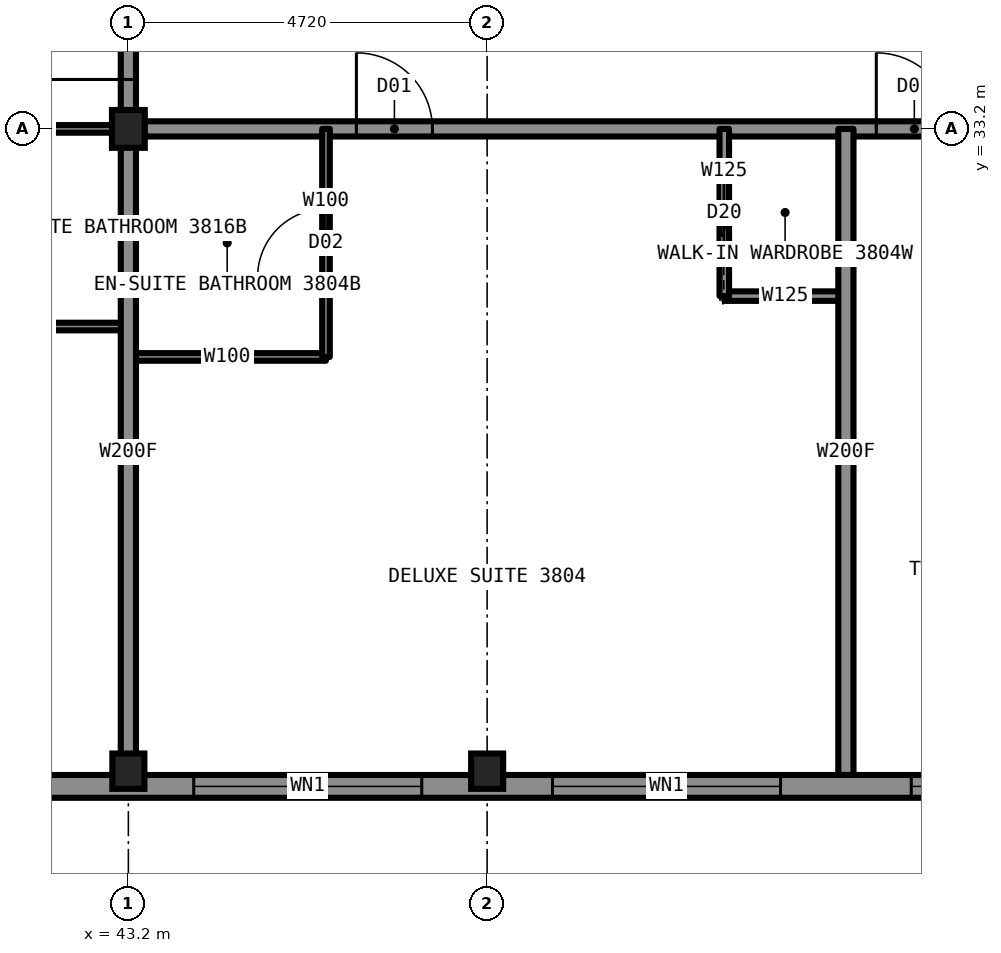
"""IFC4 building model, lengths in metres.
Left out: names, types, materials, properties, quantities, classifications, styles, units other than length and angle.
Written with IfcOpenShell. Run it as: python <this file> out.ifc"""

import sys

from ifc_helpers import new_model, si_unit, direction, frame, frame_2d, origin, origin_2d, place, context, subcontext, project, spatial, rectangle, i_section, extrude, element, fill, save


model = new_model("IFC4")
c1 = context("Model", 3, precision=1e-05, world=origin(), true_north=direction((0.0, 1.0)))
c2 = subcontext(c1, "Body", "Model", "MODEL_VIEW")
j1 = project(units=[si_unit("LENGTHUNIT", "METRE"), si_unit("PLANEANGLEUNIT", "RADIAN")], contexts=[c1])
p1 = place(None, origin())
s1 = spatial("IfcSite", under=j1, at=p1, CompositionType="ELEMENT")
p2 = place(p1, origin())
s2 = spatial("IfcBuilding", under=s1, at=p2, CompositionType="ELEMENT")
p3 = place(p2, frame((0.0, 0.0, 135.4)))
s3 = spatial("IfcBuildingStorey", under=s2, at=p3, CompositionType="ELEMENT", Elevation=135.4)
for number, where, z_axis, x_axis in (
    (1, (43.2, 24.75, 0.0), (0.0, 0.0, 1.0), (1.0, 0.0, 0.0)),
    (2, (47.92, 24.75, 0.0), (0.0, 0.0, 1.0), (1.0, 0.0, 0.0)),
):
    element("IfcColumn", number, at=place(p3, frame(where, z_axis=z_axis, x_axis=x_axis)), inside=s3, PredefinedType="COLUMN", context=c2, shape_type="SweptSolid", body=[
        extrude(i_section(OverallWidth=0.422, OverallDepth=0.465, WebThickness=0.045, FlangeThickness=0.073, at=origin_2d()), origin(), (0.0, 0.0, 1.0), 3.5),
    ])
p4 = place(p3, frame((43.2, 33.2, 0.0), z_axis=(0.0, 0.0, 1.0), x_axis=(1.0, 0.0, 0.0)))
e3 = element("IfcColumn", 3, at=p4, inside=s3, PredefinedType="COLUMN", context=c2, shape_type="SweptSolid", body=[
    extrude(i_section(OverallWidth=0.432, OverallDepth=0.498, WebThickness=0.056, FlangeThickness=0.089, at=origin_2d()), origin(), (0.0, 0.0, 1.0), 3.5),
])
p5 = place(p3, frame((40.6, 33.2, 0.0), z_axis=(0.0, 0.0, 1.0), x_axis=(1.0, 0.0, 0.0)))
e4 = element("IfcWall", 4, at=p5, inside=s3, PredefinedType="PARTITIONING", context=c2, shape_type="SweptSolid", body=[
    extrude(rectangle(XDim=2.6, YDim=0.1, at=frame_2d((1.3, 0.0))), origin(), (0.0, 0.0, 1.0), 2.573),
])
p6 = place(p3, frame((43.2, 33.2, 0.0), z_axis=(0.0, 0.0, 1.0), x_axis=(1.0, 0.0, 0.0)))
e5 = element("IfcWall", 5, at=p6, inside=s3, PredefinedType="PARTITIONING", context=c2, shape_type="SweptSolid", body=[
    extrude(rectangle(XDim=23.6, YDim=0.2, at=frame_2d((11.8, 0.0))), origin(), (0.0, 0.0, 1.0), 3.33),
])
p7 = place(p6, frame((3.0, 0.0, 0.0)))
e6 = element("IfcOpeningElement", 6, at=p7, cuts=e5, PredefinedType="OPENING", context=c2, shape_type="SweptSolid", body=[
    extrude(rectangle(XDim=1.0, YDim=2.2, at=frame_2d((0.5, 1.1))), frame((0.0, 0.11, 0.0), z_axis=(0.0, -1.0, 0.0), x_axis=(1.0, 0.0, 0.0)), (0.0, 0.0, 1.0), 0.22),
])
p8 = place(p6, frame((9.84, 0.0, 0.0)))
e7 = element("IfcOpeningElement", 7, at=p8, cuts=e5, PredefinedType="OPENING", context=c2, shape_type="SweptSolid", body=[
    extrude(rectangle(XDim=1.0, YDim=2.2, at=frame_2d((0.5, 1.1))), frame((0.0, 0.11, 0.0), z_axis=(0.0, -1.0, 0.0), x_axis=(1.0, 0.0, 0.0)), (0.0, 0.0, 1.0), 0.22),
])
p9 = place(p6, frame((16.71, 0.0, 0.0)))
e8 = element("IfcOpeningElement", 8, at=p9, cuts=e5, PredefinedType="OPENING", context=c2, shape_type="SweptSolid", body=[
    extrude(rectangle(XDim=1.0, YDim=2.2, at=frame_2d((0.5, 1.1))), frame((0.0, 0.11, 0.0), z_axis=(0.0, -1.0, 0.0), x_axis=(1.0, 0.0, 0.0)), (0.0, 0.0, 1.0), 0.22),
])
p10 = place(p6, frame((20.34, 0.0, 0.0)))
e9 = element("IfcOpeningElement", 9, at=p10, cuts=e5, PredefinedType="OPENING", context=c2, shape_type="SweptSolid", body=[
    extrude(rectangle(XDim=1.0, YDim=2.2, at=frame_2d((0.5, 1.1))), frame((0.0, 0.11, 0.0), z_axis=(0.0, -1.0, 0.0), x_axis=(1.0, 0.0, 0.0)), (0.0, 0.0, 1.0), 0.22),
])
p11 = place(p3, frame((51.04, 31.0, 0.0), z_axis=(0.0, 0.0, 1.0), x_axis=(1.0, 0.0, 0.0)))
e10 = element("IfcWall", 10, at=p11, inside=s3, PredefinedType="PARTITIONING", context=c2, shape_type="SweptSolid", body=[
    extrude(rectangle(XDim=1.6, YDim=0.125, at=frame_2d((0.8, 0.0))), origin(), (0.0, 0.0, 1.0), 3.33),
])
p12 = place(p3, frame((40.6, 30.6, 0.0), z_axis=(0.0, 0.0, 1.0), x_axis=(1.0, 0.0, 0.0)))
e11 = element("IfcWall", 11, at=p12, inside=s3, PredefinedType="PARTITIONING", context=c2, shape_type="SweptSolid", body=[
    extrude(rectangle(XDim=2.6, YDim=0.1, at=frame_2d((1.3, 0.0))), origin(), (0.0, 0.0, 1.0), 3.33),
])
p13 = place(p3, frame((43.2, 30.2, 0.0), z_axis=(0.0, 0.0, 1.0), x_axis=(1.0, 0.0, 0.0)))
e12 = element("IfcWall", 12, at=p13, inside=s3, PredefinedType="PARTITIONING", context=c2, shape_type="SweptSolid", body=[
    extrude(rectangle(XDim=2.6, YDim=0.1, at=frame_2d((1.3, 0.0))), origin(), (0.0, 0.0, 1.0), 3.33),
])
p14 = place(p3, frame((43.2, 33.2, 0.0), z_axis=(0.0, 0.0, 1.0), x_axis=(0.0, 1.0, 0.0)))
e13 = element("IfcWall", 13, at=p14, inside=s3, PredefinedType="PARTITIONING", context=c2, shape_type="SweptSolid", body=[
    extrude(rectangle(XDim=23.6, YDim=0.2, at=frame_2d((11.8, 0.0))), origin(), (0.0, 0.0, 1.0), 3.33),
])
p15 = place(p14, frame((6.98, 0.0, 0.0)))
e14 = element("IfcOpeningElement", 14, at=p15, cuts=e13, PredefinedType="OPENING", context=c2, shape_type="SweptSolid", body=[
    extrude(rectangle(XDim=1.0, YDim=2.2, at=frame_2d((0.5, 1.1))), frame((0.0, 0.11, 0.0), z_axis=(0.0, -1.0, 0.0), x_axis=(1.0, 0.0, 0.0)), (0.0, 0.0, 1.0), 0.22),
])
p16 = place(p14, frame((11.7, 0.0, 0.0)))
e15 = element("IfcOpeningElement", 15, at=p16, cuts=e13, PredefinedType="OPENING", context=c2, shape_type="SweptSolid", body=[
    extrude(rectangle(XDim=1.0, YDim=2.2, at=frame_2d((0.5, 1.1))), frame((0.0, 0.11, 0.0), z_axis=(0.0, -1.0, 0.0), x_axis=(1.0, 0.0, 0.0)), (0.0, 0.0, 1.0), 0.22),
])
p17 = place(p14, frame((15.62, 0.0, 0.0)))
e16 = element("IfcOpeningElement", 16, at=p17, cuts=e13, PredefinedType="OPENING", context=c2, shape_type="SweptSolid", body=[
    extrude(rectangle(XDim=1.0, YDim=2.2, at=frame_2d((0.5, 1.1))), frame((0.0, 0.11, 0.0), z_axis=(0.0, -1.0, 0.0), x_axis=(1.0, 0.0, 0.0)), (0.0, 0.0, 1.0), 0.22),
])
p18 = place(p14, frame((21.85, 0.0, 0.0)))
e17 = element("IfcOpeningElement", 17, at=p18, cuts=e13, PredefinedType="OPENING", context=c2, shape_type="SweptSolid", body=[
    extrude(rectangle(XDim=1.1, YDim=2.2, at=frame_2d((0.55, 1.1))), frame((0.0, 0.11, 0.0), z_axis=(0.0, -1.0, 0.0), x_axis=(1.0, 0.0, 0.0)), (0.0, 0.0, 1.0), 0.22),
])
p19 = place(p14, frame((0.65, 0.0, 0.0)))
e18 = element("IfcOpeningElement", 18, at=p19, cuts=e13, PredefinedType="OPENING", context=c2, shape_type="SweptSolid", body=[
    extrude(rectangle(XDim=1.1, YDim=2.2, at=frame_2d((0.55, 1.1))), frame((0.0, 0.11, 0.0), z_axis=(0.0, -1.0, 0.0), x_axis=(1.0, 0.0, 0.0)), (0.0, 0.0, 1.0), 0.22),
])
p20 = place(p3, frame((43.2, 24.7, 0.0), z_axis=(0.0, 0.0, 1.0), x_axis=(0.0, 1.0, 0.0)))
e19 = element("IfcWall", 19, at=p20, inside=s3, PredefinedType="PARTITIONING", context=c2, shape_type="SweptSolid", body=[
    extrude(rectangle(XDim=8.5, YDim=0.2, at=frame_2d((4.25, 0.0))), origin(), (0.0, 0.0, 1.0), 2.573),
])
p21 = place(p3, frame((52.64, 24.7, 0.0), z_axis=(0.0, 0.0, 1.0), x_axis=(0.0, 1.0, 0.0)))
e20 = element("IfcWall", 20, at=p21, inside=s3, PredefinedType="PARTITIONING", context=c2, shape_type="SweptSolid", body=[
    extrude(rectangle(XDim=8.5, YDim=0.2, at=frame_2d((4.25, 0.0))), origin(), (0.0, 0.0, 1.0), 3.33),
])
p22 = place(p3, frame((51.04, 31.0, 0.0), z_axis=(0.0, 0.0, 1.0), x_axis=(0.0, 1.0, 0.0)))
e21 = element("IfcWall", 21, at=p22, inside=s3, PredefinedType="PARTITIONING", context=c2, shape_type="SweptSolid", body=[
    extrude(rectangle(XDim=2.2, YDim=0.125, at=frame_2d((1.1, 0.0))), origin(), (0.0, 0.0, 1.0), 3.33),
])
p23 = place(p22, frame((0.7, 0.0, 0.0)))
e22 = element("IfcOpeningElement", 22, at=p23, cuts=e21, PredefinedType="OPENING", context=c2, shape_type="SweptSolid", body=[
    extrude(rectangle(XDim=0.8, YDim=2.1, at=frame_2d((0.4, 1.05))), frame((0.0, 0.073, 0.0), z_axis=(0.0, -1.0, 0.0), x_axis=(1.0, 0.0, 0.0)), (0.0, 0.0, 1.0), 0.145),
])
p24 = place(p3, frame((45.8, 30.2, 0.0), z_axis=(0.0, 0.0, 1.0), x_axis=(0.0, 1.0, 0.0)))
e23 = element("IfcWall", 23, at=p24, inside=s3, PredefinedType="PARTITIONING", context=c2, shape_type="SweptSolid", body=[
    extrude(rectangle(XDim=3.0, YDim=0.1, at=frame_2d((1.5, 0.0))), origin(), (0.0, 0.0, 1.0), 3.33),
])
p25 = place(p24, frame((1.05, 0.0, 0.0)))
e24 = element("IfcOpeningElement", 24, at=p25, cuts=e23, PredefinedType="OPENING", context=c2, shape_type="SweptSolid", body=[
    extrude(rectangle(XDim=0.9, YDim=2.1, at=frame_2d((0.45, 1.05))), frame((0.0, 0.06, 0.0), z_axis=(0.0, -1.0, 0.0), x_axis=(1.0, 0.0, 0.0)), (0.0, 0.0, 1.0), 0.12),
])
p26 = place(p3, frame((39.9, 24.55, 0.0), z_axis=(0.0, 0.0, 1.0), x_axis=(1.0, 0.0, 0.0)))
e25 = element("IfcWall", 25, at=p26, inside=s3, PredefinedType="SOLIDWALL", context=c2, shape_type="SweptSolid", body=[
    extrude(rectangle(XDim=30.2, YDim=0.3, at=frame_2d((15.1, 0.0))), origin(), (0.0, 0.0, 1.0), 2.83),
])
p27 = place(p26, frame((0.85, 0.0, 0.5)))
e26 = element("IfcOpeningElement", 26, at=p27, cuts=e25, PredefinedType="OPENING", context=c2, shape_type="SweptSolid", body=[
    extrude(rectangle(XDim=1.6, YDim=2.0, at=frame_2d((0.8, 1.0))), frame((0.0, 0.16, 0.0), z_axis=(0.0, -1.0, 0.0), x_axis=(1.0, 0.0, 0.0)), (0.0, 0.0, 1.0), 0.32),
])
p28 = place(p26, frame((4.16, 0.0, 0.5)))
e27 = element("IfcOpeningElement", 27, at=p28, cuts=e25, PredefinedType="OPENING", context=c2, shape_type="SweptSolid", body=[
    extrude(rectangle(XDim=1.3, YDim=1.9, at=frame_2d((0.65, 0.95))), frame((0.0, 0.16, 0.0), z_axis=(0.0, -1.0, 0.0), x_axis=(1.0, 0.0, 0.0)), (0.0, 0.0, 1.0), 0.32),
])
p29 = place(p26, frame((8.88, 0.0, 0.5)))
e28 = element("IfcOpeningElement", 28, at=p29, cuts=e25, PredefinedType="OPENING", context=c2, shape_type="SweptSolid", body=[
    extrude(rectangle(XDim=3.0, YDim=2.0, at=frame_2d((1.5, 1.0))), frame((0.0, 0.16, 0.0), z_axis=(0.0, -1.0, 0.0), x_axis=(1.0, 0.0, 0.0)), (0.0, 0.0, 1.0), 0.32),
])
p30 = place(p26, frame((13.6, 0.0, 0.5)))
e29 = element("IfcOpeningElement", 29, at=p30, cuts=e25, PredefinedType="OPENING", context=c2, shape_type="SweptSolid", body=[
    extrude(rectangle(XDim=3.0, YDim=2.0, at=frame_2d((1.5, 1.0))), frame((0.0, 0.16, 0.0), z_axis=(0.0, -1.0, 0.0), x_axis=(1.0, 0.0, 0.0)), (0.0, 0.0, 1.0), 0.32),
])
p31 = place(p26, frame((18.32, 0.0, 0.5)))
e30 = element("IfcOpeningElement", 30, at=p31, cuts=e25, PredefinedType="OPENING", context=c2, shape_type="SweptSolid", body=[
    extrude(rectangle(XDim=3.0, YDim=2.0, at=frame_2d((1.5, 1.0))), frame((0.0, 0.16, 0.0), z_axis=(0.0, -1.0, 0.0), x_axis=(1.0, 0.0, 0.0)), (0.0, 0.0, 1.0), 0.32),
])
p32 = place(p26, frame((24.69, 0.0, 0.5)))
e31 = element("IfcOpeningElement", 31, at=p32, cuts=e25, PredefinedType="OPENING", context=c2, shape_type="SweptSolid", body=[
    extrude(rectangle(XDim=1.3, YDim=1.9, at=frame_2d((0.65, 0.95))), frame((0.0, 0.16, 0.0), z_axis=(0.0, -1.0, 0.0), x_axis=(1.0, 0.0, 0.0)), (0.0, 0.0, 1.0), 0.32),
])
p33 = place(p26, frame((27.75, 0.0, 0.5)))
e32 = element("IfcOpeningElement", 32, at=p33, cuts=e25, PredefinedType="OPENING", context=c2, shape_type="SweptSolid", body=[
    extrude(rectangle(XDim=1.6, YDim=2.0, at=frame_2d((0.8, 1.0))), frame((0.0, 0.16, 0.0), z_axis=(0.0, -1.0, 0.0), x_axis=(1.0, 0.0, 0.0)), (0.0, 0.0, 1.0), 0.32),
])
p34 = place(p26, frame((5.51, 0.0, 0.5)))
e33 = element("IfcOpeningElement", 33, at=p34, cuts=e25, PredefinedType="OPENING", context=c2, shape_type="SweptSolid", body=[
    extrude(rectangle(XDim=0.7, YDim=0.9, at=frame_2d((0.35, 0.45))), frame((0.0, 0.16, 0.0), z_axis=(0.0, -1.0, 0.0), x_axis=(1.0, 0.0, 0.0)), (0.0, 0.0, 1.0), 0.32),
])
p35 = place(p26, frame((23.99, 0.0, 0.5)))
e34 = element("IfcOpeningElement", 34, at=p35, cuts=e25, PredefinedType="OPENING", context=c2, shape_type="SweptSolid", body=[
    extrude(rectangle(XDim=0.7, YDim=0.9, at=frame_2d((0.35, 0.45))), frame((0.0, 0.16, 0.0), z_axis=(0.0, -1.0, 0.0), x_axis=(1.0, 0.0, 0.0)), (0.0, 0.0, 1.0), 0.32),
])
p36 = place(p7, origin())
e35 = element("IfcDoor", 35, at=p36, inside=s3, OperationType="SINGLE_SWING_LEFT", PredefinedType="DOOR", context=c2, shape_type="SweptSolid", body=[
    extrude(rectangle(XDim=1.0, YDim=2.2, at=frame_2d((0.5, 1.1))), frame((0.0, 0.025, 0.0), z_axis=(0.0, -1.0, 0.0), x_axis=(1.0, 0.0, 0.0)), (0.0, 0.0, 1.0), 0.05),
])
fill(e6, e35)
p37 = place(p25, origin())
e36 = element("IfcDoor", 36, at=p37, inside=s3, OperationType="SINGLE_SWING_RIGHT", PredefinedType="DOOR", context=c2, shape_type="SweptSolid", body=[
    extrude(rectangle(XDim=0.9, YDim=2.1, at=frame_2d((0.45, 1.05))), frame((0.0, 0.025, 0.0), z_axis=(0.0, -1.0, 0.0), x_axis=(1.0, 0.0, 0.0)), (0.0, 0.0, 1.0), 0.05),
])
fill(e24, e36)
p38 = place(p23, origin())
e37 = element("IfcDoor", 37, at=p38, inside=s3, OperationType="SLIDING_TO_LEFT", PredefinedType="DOOR", context=c2, shape_type="SweptSolid", body=[
    extrude(rectangle(XDim=0.8, YDim=2.1, at=frame_2d((0.4, 1.05))), frame((0.0, 0.025, 0.0), z_axis=(0.0, -1.0, 0.0), x_axis=(1.0, 0.0, 0.0)), (0.0, 0.0, 1.0), 0.05),
])
fill(e22, e37)
p39 = place(p8, origin())
e38 = element("IfcDoor", 38, at=p39, inside=s3, OperationType="SINGLE_SWING_LEFT", PredefinedType="DOOR", context=c2, shape_type="SweptSolid", body=[
    extrude(rectangle(XDim=1.0, YDim=2.2, at=frame_2d((0.5, 1.1))), frame((0.0, 0.025, 0.0), z_axis=(0.0, -1.0, 0.0), x_axis=(1.0, 0.0, 0.0)), (0.0, 0.0, 1.0), 0.05),
])
fill(e7, e38)
p40 = place(p19, origin())
e39 = element("IfcDoor", 39, at=p40, inside=s3, OperationType="SINGLE_SWING_LEFT", PredefinedType="DOOR", context=c2, shape_type="SweptSolid", body=[
    extrude(rectangle(XDim=1.1, YDim=2.2, at=frame_2d((0.55, 1.1))), frame((0.0, 0.025, 0.0), z_axis=(0.0, -1.0, 0.0), x_axis=(1.0, 0.0, 0.0)), (0.0, 0.0, 1.0), 0.05),
])
fill(e18, e39)
p41 = place(p27, origin())
e40 = element("IfcWindow", 40, at=p41, inside=s3, PartitioningType="SINGLE_PANEL", PredefinedType="WINDOW", context=c2, shape_type="SweptSolid", body=[
    extrude(rectangle(XDim=1.6, YDim=2.0, at=frame_2d((0.8, 1.0))), frame((0.0, 0.03, 0.0), z_axis=(0.0, -1.0, 0.0), x_axis=(1.0, 0.0, 0.0)), (0.0, 0.0, 1.0), 0.06),
])
fill(e26, e40)
p42 = place(p28, origin())
e41 = element("IfcWindow", 41, at=p42, inside=s3, PartitioningType="SINGLE_PANEL", PredefinedType="WINDOW", context=c2, shape_type="SweptSolid", body=[
    extrude(rectangle(XDim=1.3, YDim=1.9, at=frame_2d((0.65, 0.95))), frame((0.0, 0.03, 0.0), z_axis=(0.0, -1.0, 0.0), x_axis=(1.0, 0.0, 0.0)), (0.0, 0.0, 1.0), 0.06),
])
fill(e27, e41)
p43 = place(p29, origin())
e42 = element("IfcWindow", 42, at=p43, inside=s3, PartitioningType="SINGLE_PANEL", PredefinedType="WINDOW", context=c2, shape_type="SweptSolid", body=[
    extrude(rectangle(XDim=3.0, YDim=2.0, at=frame_2d((1.5, 1.0))), frame((0.0, 0.03, 0.0), z_axis=(0.0, -1.0, 0.0), x_axis=(1.0, 0.0, 0.0)), (0.0, 0.0, 1.0), 0.06),
])
fill(e28, e42)
p44 = place(p30, origin())
e43 = element("IfcWindow", 43, at=p44, inside=s3, PartitioningType="SINGLE_PANEL", PredefinedType="WINDOW", context=c2, shape_type="SweptSolid", body=[
    extrude(rectangle(XDim=3.0, YDim=2.0, at=frame_2d((1.5, 1.0))), frame((0.0, 0.03, 0.0), z_axis=(0.0, -1.0, 0.0), x_axis=(1.0, 0.0, 0.0)), (0.0, 0.0, 1.0), 0.06),
])
fill(e29, e43)
p45 = place(p34, origin())
e44 = element("IfcWindow", 44, at=p45, inside=s3, PartitioningType="SINGLE_PANEL", PredefinedType="WINDOW", context=c2, shape_type="SweptSolid", body=[
    extrude(rectangle(XDim=0.7, YDim=0.9, at=frame_2d((0.35, 0.45))), frame((0.0, 0.03, 0.0), z_axis=(0.0, -1.0, 0.0), x_axis=(1.0, 0.0, 0.0)), (0.0, 0.0, 1.0), 0.06),
])
fill(e33, e44)
save(model, sys.argv[1])
